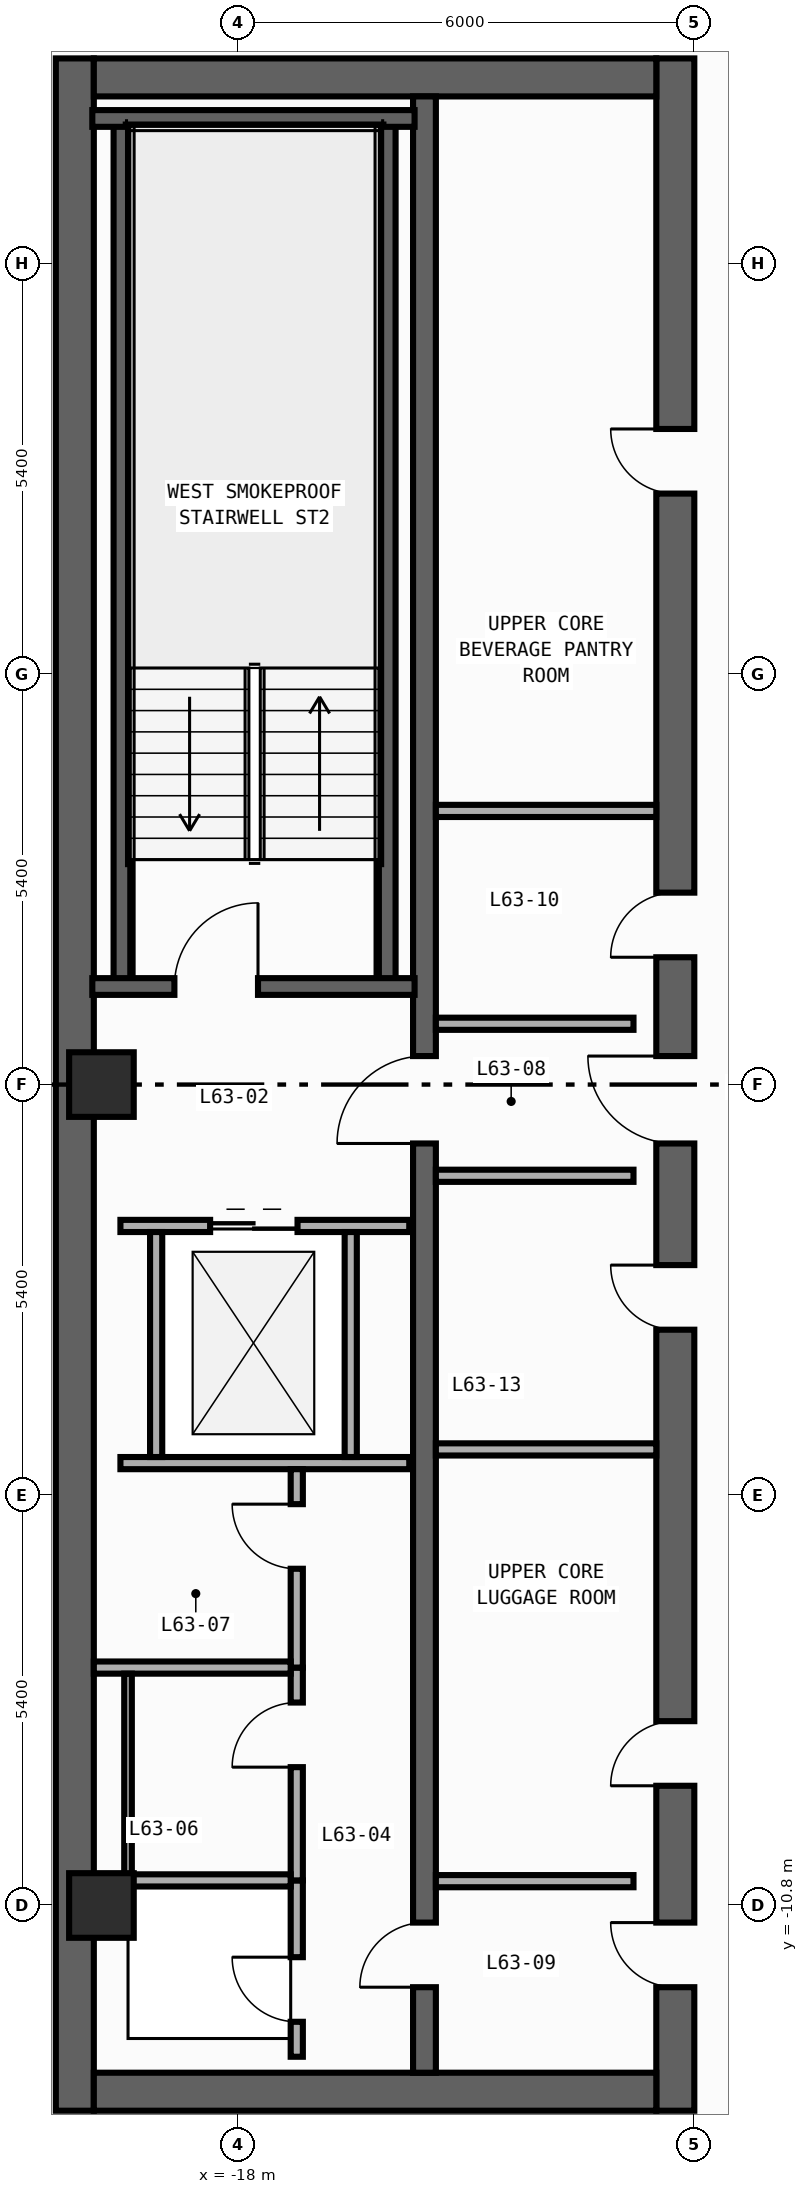
"""IFC4 building model, lengths in metres.
Left out: names, types, materials, properties, quantities, classifications, styles, units other than length and angle.
Written with IfcOpenShell. Run it as: python <this file> out.ifc"""

import sys

from ifc_helpers import new_model, si_unit, direction, frame, frame_2d, origin, origin_2d, place, context, subcontext, project, spatial, rectangle, extrude, element, fill, save


model = new_model("IFC4")
c1 = context("Model", 3, precision=1e-05, world=origin(), true_north=direction((0.0, 1.0)))
c2 = subcontext(c1, "Body", "Model", "MODEL_VIEW")
j1 = project(units=[si_unit("LENGTHUNIT", "METRE"), si_unit("PLANEANGLEUNIT", "RADIAN")], contexts=[c1])
p1 = place(None, origin())
s1 = spatial("IfcSite", under=j1, at=p1, CompositionType="ELEMENT")
p2 = place(p1, origin())
s2 = spatial("IfcBuilding", under=s1, at=p2, CompositionType="ELEMENT")
p3 = place(p2, frame((0.0, 0.0, 265.6)))
s3 = spatial("IfcBuildingStorey", under=s2, at=p3, CompositionType="ELEMENT", Elevation=265.6)
p4 = place(p3, frame((-20.15, -13.5, 0.0), z_axis=(0.0, 0.0, 1.0), x_axis=(0.0, 1.0, 0.0)))
e1 = element("IfcWall", 1, at=p4, inside=s3, PredefinedType="SHEAR", context=c2, shape_type="SweptSolid", body=[
    extrude(rectangle(XDim=27.0, YDim=0.5, at=frame_2d((13.5, 0.0))), origin(), (0.0, 0.0, 1.0), 3.34),
])
p5 = place(p3, frame((-12.25, -13.5, 0.0), z_axis=(0.0, 0.0, 1.0), x_axis=(0.0, 1.0, 0.0)))
e2 = element("IfcWall", 2, at=p5, inside=s3, PredefinedType="SHEAR", context=c2, shape_type="SweptSolid", body=[
    extrude(rectangle(XDim=27.0, YDim=0.5, at=frame_2d((13.5, 0.0))), origin(), (0.0, 0.0, 1.0), 3.34),
])
p6 = place(p5, frame((15.175, 0.0, 0.0)))
e3 = element("IfcOpeningElement", 3, at=p6, cuts=e2, PredefinedType="OPENING", context=c2, shape_type="SweptSolid", body=[
    extrude(rectangle(XDim=0.85, YDim=2.1, at=frame_2d((0.425, 1.05))), frame((0.0, 0.26, 0.0), z_axis=(0.0, -1.0, 0.0), x_axis=(1.0, 0.0, 0.0)), (0.0, 0.0, 1.0), 0.52),
])
p7 = place(p5, frame((21.275, 0.0, 0.0)))
e4 = element("IfcOpeningElement", 4, at=p7, cuts=e2, PredefinedType="OPENING", context=c2, shape_type="SweptSolid", body=[
    extrude(rectangle(XDim=0.85, YDim=2.1, at=frame_2d((0.425, 1.05))), frame((0.0, 0.26, 0.0), z_axis=(0.0, -1.0, 0.0), x_axis=(1.0, 0.0, 0.0)), (0.0, 0.0, 1.0), 0.52),
])
p8 = place(p5, frame((4.275, 0.0, 0.0)))
e5 = element("IfcOpeningElement", 5, at=p8, cuts=e2, PredefinedType="OPENING", context=c2, shape_type="SweptSolid", body=[
    extrude(rectangle(XDim=0.85, YDim=2.1, at=frame_2d((0.425, 1.05))), frame((0.0, 0.26, 0.0), z_axis=(0.0, -1.0, 0.0), x_axis=(1.0, 0.0, 0.0)), (0.0, 0.0, 1.0), 0.52),
])
p9 = place(p5, frame((10.275, 0.0, 0.0)))
e6 = element("IfcOpeningElement", 6, at=p9, cuts=e2, PredefinedType="OPENING", context=c2, shape_type="SweptSolid", body=[
    extrude(rectangle(XDim=0.85, YDim=2.1, at=frame_2d((0.425, 1.05))), frame((0.0, 0.26, 0.0), z_axis=(0.0, -1.0, 0.0), x_axis=(1.0, 0.0, 0.0)), (0.0, 0.0, 1.0), 0.52),
])
p10 = place(p5, frame((12.725, 0.0, 0.0)))
e7 = element("IfcOpeningElement", 7, at=p10, cuts=e2, PredefinedType="OPENING", context=c2, shape_type="SweptSolid", body=[
    extrude(rectangle(XDim=1.15, YDim=2.2, at=frame_2d((0.575, 1.1))), frame((0.0, 0.26, 0.0), z_axis=(0.0, -1.0, 0.0), x_axis=(1.0, 0.0, 0.0)), (0.0, 0.0, 1.0), 0.52),
])
p11 = place(p5, frame((1.625, 0.0, 0.0)))
e8 = element("IfcOpeningElement", 8, at=p11, cuts=e2, PredefinedType="OPENING", context=c2, shape_type="SweptSolid", body=[
    extrude(rectangle(XDim=0.85, YDim=2.1, at=frame_2d((0.425, 1.05))), frame((0.0, 0.26, 0.0), z_axis=(0.0, -1.0, 0.0), x_axis=(1.0, 0.0, 0.0)), (0.0, 0.0, 1.0), 0.52),
])
for number, where, z_axis, x_axis in (
    (9, (-19.9, -13.25, 0.0), (0.0, 0.0, 1.0), (1.0, 0.0, 0.0)),
    (10, (-19.9, 13.25, 0.0), (0.0, 0.0, 1.0), (1.0, 0.0, 0.0)),
):
    element("IfcWall", number, at=place(p3, frame(where, z_axis=z_axis, x_axis=x_axis)), inside=s3, PredefinedType="SHEAR", context=c2, shape_type="SweptSolid", body=[
        extrude(rectangle(XDim=7.4, YDim=0.5, at=frame_2d((3.7, 0.0))), origin(), (0.0, 0.0, 1.0), 3.34),
    ])
p12 = place(p3, frame((-15.55, -13.0, 0.0), z_axis=(0.0, 0.0, 1.0), x_axis=(0.0, 1.0, 0.0)))
e11 = element("IfcWall", 11, at=p12, inside=s3, PredefinedType="SHEAR", context=c2, shape_type="SweptSolid", body=[
    extrude(rectangle(XDim=26.0, YDim=0.3, at=frame_2d((13.0, 0.0))), origin(), (0.0, 0.0, 1.0), 3.34),
])
p13 = place(p12, frame((12.225, 0.0, 0.0)))
e12 = element("IfcOpeningElement", 12, at=p13, cuts=e11, PredefinedType="OPENING", context=c2, shape_type="SweptSolid", body=[
    extrude(rectangle(XDim=1.15, YDim=2.2, at=frame_2d((0.575, 1.1))), frame((0.0, 0.16, 0.0), z_axis=(0.0, -1.0, 0.0), x_axis=(1.0, 0.0, 0.0)), (0.0, 0.0, 1.0), 0.32),
])
p14 = place(p12, frame((1.125, 0.0, 0.0)))
e13 = element("IfcOpeningElement", 13, at=p14, cuts=e11, PredefinedType="OPENING", context=c2, shape_type="SweptSolid", body=[
    extrude(rectangle(XDim=0.85, YDim=2.1, at=frame_2d((0.425, 1.05))), frame((0.0, 0.16, 0.0), z_axis=(0.0, -1.0, 0.0), x_axis=(1.0, 0.0, 0.0)), (0.0, 0.0, 1.0), 0.32),
])
for number, where, z_axis, x_axis in (
    (14, (-16.04, 1.29, 0.0), (0.0, 0.0, 1.0), (0.0, 1.0, 0.0)),
    (15, (-19.53, 1.29, 0.0), (0.0, 0.0, 1.0), (0.0, 1.0, 0.0)),
):
    element("IfcWall", number, at=place(p3, frame(where, z_axis=z_axis, x_axis=x_axis)), inside=s3, PredefinedType="SHEAR", context=c2, shape_type="SweptSolid", body=[
        extrude(rectangle(XDim=11.42, YDim=0.22, at=frame_2d((5.71, 0.0))), origin(), (0.0, 0.0, 1.0), 3.34),
    ])
p15 = place(p3, frame((-19.92, 12.71, 0.0), z_axis=(0.0, 0.0, 1.0), x_axis=(1.0, 0.0, 0.0)))
e16 = element("IfcWall", 16, at=p15, inside=s3, PredefinedType="SHEAR", context=c2, shape_type="SweptSolid", body=[
    extrude(rectangle(XDim=4.24, YDim=0.22, at=frame_2d((2.12, 0.0))), origin(), (0.0, 0.0, 1.0), 3.34),
])
p16 = place(p3, frame((-19.92, 1.29, 0.0), z_axis=(0.0, 0.0, 1.0), x_axis=(1.0, 0.0, 0.0)))
e17 = element("IfcWall", 17, at=p16, inside=s3, PredefinedType="SHEAR", context=c2, shape_type="SweptSolid", body=[
    extrude(rectangle(XDim=4.24, YDim=0.22, at=frame_2d((2.12, 0.0))), origin(), (0.0, 0.0, 1.0), 3.34),
])
p17 = place(p16, frame((1.08, 0.0, 0.0)))
e18 = element("IfcOpeningElement", 18, at=p17, cuts=e17, PredefinedType="OPENING", context=c2, shape_type="SweptSolid", body=[
    extrude(rectangle(XDim=1.1, YDim=2.2, at=frame_2d((0.55, 1.1))), frame((0.0, 0.12, 0.0), z_axis=(0.0, -1.0, 0.0), x_axis=(1.0, 0.0, 0.0)), (0.0, 0.0, 1.0), 0.24),
])
for number, where, z_axis, x_axis in (
    (19, (-19.8, -10.8, 0.0), (0.0, 0.0, 1.0), (1.0, 0.0, 0.0)),
    (20, (-19.8, 0.0, 0.0), (0.0, 0.0, 1.0), (1.0, 0.0, 0.0)),
):
    element("IfcColumn", number, at=place(p3, frame(where, z_axis=z_axis, x_axis=x_axis)), inside=s3, PredefinedType="COLUMN", context=c2, shape_type="SweptSolid", body=[
        extrude(rectangle(XDim=0.85, YDim=0.85, at=origin_2d()), origin(), (0.0, 0.0, 1.0), 3.6),
    ])
p18 = place(p3, frame((-19.55, -1.86, 0.0), z_axis=(0.0, 0.0, 1.0), x_axis=(1.0, 0.0, 0.0)))
e21 = element("IfcWall", 21, at=p18, inside=s3, PredefinedType="STANDARD", context=c2, shape_type="SweptSolid", body=[
    extrude(rectangle(XDim=3.8, YDim=0.16, at=frame_2d((1.9, 0.0))), origin(), (0.0, 0.0, 1.0), 3.34),
])
p19 = place(p18, frame((1.18, 0.0, 0.0)))
e22 = element("IfcOpeningElement", 22, at=p19, cuts=e21, PredefinedType="OPENING", context=c2, shape_type="SweptSolid", body=[
    extrude(rectangle(XDim=1.15, YDim=2.2, at=frame_2d((0.575, 1.1))), frame((0.0, 0.09, 0.0), z_axis=(0.0, -1.0, 0.0), x_axis=(1.0, 0.0, 0.0)), (0.0, 0.0, 1.0), 0.18),
])
p20 = place(p3, frame((-19.55, -4.98, 0.0), z_axis=(0.0, 0.0, 1.0), x_axis=(1.0, 0.0, 0.0)))
e23 = element("IfcWall", 23, at=p20, inside=s3, PredefinedType="STANDARD", context=c2, shape_type="SweptSolid", body=[
    extrude(rectangle(XDim=3.8, YDim=0.16, at=frame_2d((1.9, 0.0))), origin(), (0.0, 0.0, 1.0), 3.34),
])
for number, where, z_axis, x_axis in (
    (24, (-19.08, -4.9, 0.0), (0.0, 0.0, 1.0), (0.0, 1.0, 0.0)),
    (25, (-16.52, -4.9, 0.0), (0.0, 0.0, 1.0), (0.0, 1.0, 0.0)),
):
    element("IfcWall", number, at=place(p3, frame(where, z_axis=z_axis, x_axis=x_axis)), inside=s3, PredefinedType="STANDARD", context=c2, shape_type="SweptSolid", body=[
        extrude(rectangle(XDim=2.96, YDim=0.16, at=frame_2d((1.48, 0.0))), origin(), (0.0, 0.0, 1.0), 3.34),
    ])
for number, where, z_axis, x_axis in (
    (26, (-15.4, 0.8, 0.0), (0.0, 0.0, 1.0), (1.0, 0.0, 0.0)),
    (27, (-15.4, -1.2, 0.0), (0.0, 0.0, 1.0), (1.0, 0.0, 0.0)),
    (28, (-15.4, -10.48, 0.0), (0.0, 0.0, 1.0), (1.0, 0.0, 0.0)),
):
    element("IfcWall", number, at=place(p3, frame(where, z_axis=z_axis, x_axis=x_axis)), inside=s3, PredefinedType="STANDARD", context=c2, shape_type="SweptSolid", body=[
        extrude(rectangle(XDim=2.6, YDim=0.16, at=frame_2d((1.3, 0.0))), origin(), (0.0, 0.0, 1.0), 3.34),
    ])
p21 = place(p3, frame((-17.23, -12.79, 0.0), z_axis=(0.0, 0.0, 1.0), x_axis=(0.0, 1.0, 0.0)))
e29 = element("IfcWall", 29, at=p21, inside=s3, PredefinedType="PARTITIONING", context=c2, shape_type="SweptSolid", body=[
    extrude(rectangle(XDim=2.32, YDim=0.16, at=frame_2d((1.16, 0.0))), origin(), (0.0, 0.0, 1.0), 3.34),
])
p22 = place(p21, frame((0.46, 0.0, 0.0)))
e30 = element("IfcOpeningElement", 30, at=p22, cuts=e29, PredefinedType="OPENING", context=c2, shape_type="SweptSolid", body=[
    extrude(rectangle(XDim=0.85, YDim=2.1, at=frame_2d((0.425, 1.05))), frame((0.0, 0.09, 0.0), z_axis=(0.0, -1.0, 0.0), x_axis=(1.0, 0.0, 0.0)), (0.0, 0.0, 1.0), 0.18),
])
p23 = place(p3, frame((-17.23, -10.47, 0.0), z_axis=(0.0, 0.0, 1.0), x_axis=(0.0, 1.0, 0.0)))
e31 = element("IfcWall", 31, at=p23, inside=s3, PredefinedType="PARTITIONING", context=c2, shape_type="SweptSolid", body=[
    extrude(rectangle(XDim=2.8, YDim=0.16, at=frame_2d((1.4, 0.0))), origin(), (0.0, 0.0, 1.0), 3.34),
])
p24 = place(p23, frame((1.49, 0.0, 0.0)))
e32 = element("IfcOpeningElement", 32, at=p24, cuts=e31, PredefinedType="OPENING", context=c2, shape_type="SweptSolid", body=[
    extrude(rectangle(XDim=0.85, YDim=2.1, at=frame_2d((0.425, 1.05))), frame((0.0, 0.09, 0.0), z_axis=(0.0, -1.0, 0.0), x_axis=(1.0, 0.0, 0.0)), (0.0, 0.0, 1.0), 0.18),
])
p25 = place(p3, frame((-17.23, -7.67, 0.0), z_axis=(0.0, 0.0, 1.0), x_axis=(0.0, 1.0, 0.0)))
e33 = element("IfcWall", 33, at=p25, inside=s3, PredefinedType="PARTITIONING", context=c2, shape_type="SweptSolid", body=[
    extrude(rectangle(XDim=2.61, YDim=0.16, at=frame_2d((1.305, 0.0))), origin(), (0.0, 0.0, 1.0), 3.34),
])
p26 = place(p25, frame((1.3, 0.0, 0.0)))
e34 = element("IfcOpeningElement", 34, at=p26, cuts=e33, PredefinedType="OPENING", context=c2, shape_type="SweptSolid", body=[
    extrude(rectangle(XDim=0.85, YDim=2.1, at=frame_2d((0.425, 1.05))), frame((0.0, 0.09, 0.0), z_axis=(0.0, -1.0, 0.0), x_axis=(1.0, 0.0, 0.0)), (0.0, 0.0, 1.0), 0.18),
])
p27 = place(p3, frame((-19.75, -10.47, 0.0), z_axis=(0.0, 0.0, 1.0), x_axis=(1.0, 0.0, 0.0)))
e35 = element("IfcWall", 35, at=p27, inside=s3, PredefinedType="PARTITIONING", context=c2, shape_type="SweptSolid", body=[
    extrude(rectangle(XDim=2.44, YDim=0.16, at=frame_2d((1.22, 0.0))), origin(), (0.0, 0.0, 1.0), 3.34),
])
p28 = place(p3, frame((-19.9, -7.67, 0.0), z_axis=(0.0, 0.0, 1.0), x_axis=(1.0, 0.0, 0.0)))
e36 = element("IfcWall", 36, at=p28, inside=s3, PredefinedType="PARTITIONING", context=c2, shape_type="SweptSolid", body=[
    extrude(rectangle(XDim=2.59, YDim=0.16, at=frame_2d((1.295, 0.0))), origin(), (0.0, 0.0, 1.0), 3.34),
])
for number, where, z_axis, x_axis in (
    (37, (-15.4, 3.6, 0.0), (0.0, 0.0, 1.0), (1.0, 0.0, 0.0)),
    (38, (-15.4, -4.8, 0.0), (0.0, 0.0, 1.0), (1.0, 0.0, 0.0)),
):
    element("IfcWall", number, at=place(p3, frame(where, z_axis=z_axis, x_axis=x_axis)), inside=s3, PredefinedType="PARTITIONING", context=c2, shape_type="SweptSolid", body=[
        extrude(rectangle(XDim=2.9, YDim=0.16, at=frame_2d((1.45, 0.0))), origin(), (0.0, 0.0, 1.0), 3.34),
    ])
p29 = place(p3, frame((-19.45, -10.39, 0.0), z_axis=(0.0, 0.0, 1.0), x_axis=(0.0, 1.0, 0.0)))
e39 = element("IfcWall", 39, at=p29, inside=s3, PredefinedType="PARTITIONING", context=c2, shape_type="SweptSolid", body=[
    extrude(rectangle(XDim=2.64, YDim=0.1, at=frame_2d((1.32, 0.0))), origin(), (0.0, 0.0, 1.0), 3.34),
])
p30 = place(p17, origin())
e40 = element("IfcDoor", 40, at=p30, inside=s3, OperationType="SINGLE_SWING_RIGHT", PredefinedType="DOOR", context=c2, shape_type="SweptSolid", body=[
    extrude(rectangle(XDim=1.1, YDim=2.2, at=frame_2d((0.55, 1.1))), frame((0.0, 0.025, 0.0), z_axis=(0.0, -1.0, 0.0), x_axis=(1.0, 0.0, 0.0)), (0.0, 0.0, 1.0), 0.05),
])
fill(e18, e40)
p31 = place(p6, origin())
e41 = element("IfcDoor", 41, at=p31, inside=s3, OperationType="SINGLE_SWING_LEFT", PredefinedType="DOOR", context=c2, shape_type="SweptSolid", body=[
    extrude(rectangle(XDim=0.85, YDim=2.1, at=frame_2d((0.425, 1.05))), frame((0.0, 0.025, 0.0), z_axis=(0.0, -1.0, 0.0), x_axis=(1.0, 0.0, 0.0)), (0.0, 0.0, 1.0), 0.05),
])
fill(e3, e41)
p32 = place(p7, origin())
e42 = element("IfcDoor", 42, at=p32, inside=s3, OperationType="SINGLE_SWING_RIGHT", PredefinedType="DOOR", context=c2, shape_type="SweptSolid", body=[
    extrude(rectangle(XDim=0.85, YDim=2.1, at=frame_2d((0.425, 1.05))), frame((0.0, 0.025, 0.0), z_axis=(0.0, -1.0, 0.0), x_axis=(1.0, 0.0, 0.0)), (0.0, 0.0, 1.0), 0.05),
])
fill(e4, e42)
p33 = place(p8, origin())
e43 = element("IfcDoor", 43, at=p33, inside=s3, OperationType="SINGLE_SWING_LEFT", PredefinedType="DOOR", context=c2, shape_type="SweptSolid", body=[
    extrude(rectangle(XDim=0.85, YDim=2.1, at=frame_2d((0.425, 1.05))), frame((0.0, 0.025, 0.0), z_axis=(0.0, -1.0, 0.0), x_axis=(1.0, 0.0, 0.0)), (0.0, 0.0, 1.0), 0.05),
])
fill(e5, e43)
p34 = place(p9, origin())
e44 = element("IfcDoor", 44, at=p34, inside=s3, OperationType="SINGLE_SWING_RIGHT", PredefinedType="DOOR", context=c2, shape_type="SweptSolid", body=[
    extrude(rectangle(XDim=0.85, YDim=2.1, at=frame_2d((0.425, 1.05))), frame((0.0, 0.025, 0.0), z_axis=(0.0, -1.0, 0.0), x_axis=(1.0, 0.0, 0.0)), (0.0, 0.0, 1.0), 0.05),
])
fill(e6, e44)
p35 = place(p10, origin())
e45 = element("IfcDoor", 45, at=p35, inside=s3, OperationType="SINGLE_SWING_RIGHT", PredefinedType="DOOR", context=c2, shape_type="SweptSolid", body=[
    extrude(rectangle(XDim=1.15, YDim=2.2, at=frame_2d((0.575, 1.1))), frame((0.0, 0.025, 0.0), z_axis=(0.0, -1.0, 0.0), x_axis=(1.0, 0.0, 0.0)), (0.0, 0.0, 1.0), 0.05),
])
fill(e7, e45)
p36 = place(p13, origin())
e46 = element("IfcDoor", 46, at=p36, inside=s3, OperationType="SINGLE_SWING_LEFT", PredefinedType="DOOR", context=c2, shape_type="SweptSolid", body=[
    extrude(rectangle(XDim=1.15, YDim=2.2, at=frame_2d((0.575, 1.1))), frame((0.0, 0.025, 0.0), z_axis=(0.0, -1.0, 0.0), x_axis=(1.0, 0.0, 0.0)), (0.0, 0.0, 1.0), 0.05),
])
fill(e12, e46)
p37 = place(p11, origin())
e47 = element("IfcDoor", 47, at=p37, inside=s3, OperationType="SINGLE_SWING_RIGHT", PredefinedType="DOOR", context=c2, shape_type="SweptSolid", body=[
    extrude(rectangle(XDim=0.85, YDim=2.1, at=frame_2d((0.425, 1.05))), frame((0.0, 0.025, 0.0), z_axis=(0.0, -1.0, 0.0), x_axis=(1.0, 0.0, 0.0)), (0.0, 0.0, 1.0), 0.05),
])
fill(e8, e47)
p38 = place(p14, origin())
e48 = element("IfcDoor", 48, at=p38, inside=s3, OperationType="SINGLE_SWING_LEFT", PredefinedType="DOOR", context=c2, shape_type="SweptSolid", body=[
    extrude(rectangle(XDim=0.85, YDim=2.1, at=frame_2d((0.425, 1.05))), frame((0.0, 0.025, 0.0), z_axis=(0.0, -1.0, 0.0), x_axis=(1.0, 0.0, 0.0)), (0.0, 0.0, 1.0), 0.05),
])
fill(e13, e48)
p39 = place(p19, origin())
e49 = element("IfcDoor", 49, at=p39, inside=s3, OperationType="DOUBLE_DOOR_SLIDING", PredefinedType="DOOR", context=c2, shape_type="SweptSolid", body=[
    extrude(rectangle(XDim=1.15, YDim=2.2, at=frame_2d((0.575, 1.1))), frame((0.0, 0.025, 0.0), z_axis=(0.0, -1.0, 0.0), x_axis=(1.0, 0.0, 0.0)), (0.0, 0.0, 1.0), 0.05),
])
fill(e22, e49)
p40 = place(p22, origin())
e50 = element("IfcDoor", 50, at=p40, inside=s3, OperationType="SINGLE_SWING_RIGHT", PredefinedType="DOOR", context=c2, shape_type="SweptSolid", body=[
    extrude(rectangle(XDim=0.85, YDim=2.1, at=frame_2d((0.425, 1.05))), frame((0.0, 0.025, 0.0), z_axis=(0.0, -1.0, 0.0), x_axis=(1.0, 0.0, 0.0)), (0.0, 0.0, 1.0), 0.05),
])
fill(e30, e50)
p41 = place(p24, origin())
e51 = element("IfcDoor", 51, at=p41, inside=s3, OperationType="SINGLE_SWING_LEFT", PredefinedType="DOOR", context=c2, shape_type="SweptSolid", body=[
    extrude(rectangle(XDim=0.85, YDim=2.1, at=frame_2d((0.425, 1.05))), frame((0.0, 0.025, 0.0), z_axis=(0.0, -1.0, 0.0), x_axis=(1.0, 0.0, 0.0)), (0.0, 0.0, 1.0), 0.05),
])
fill(e32, e51)
p42 = place(p26, origin())
e52 = element("IfcDoor", 52, at=p42, inside=s3, OperationType="SINGLE_SWING_RIGHT", PredefinedType="DOOR", context=c2, shape_type="SweptSolid", body=[
    extrude(rectangle(XDim=0.85, YDim=2.1, at=frame_2d((0.425, 1.05))), frame((0.0, 0.025, 0.0), z_axis=(0.0, -1.0, 0.0), x_axis=(1.0, 0.0, 0.0)), (0.0, 0.0, 1.0), 0.05),
])
fill(e34, e52)
save(model, sys.argv[1])
